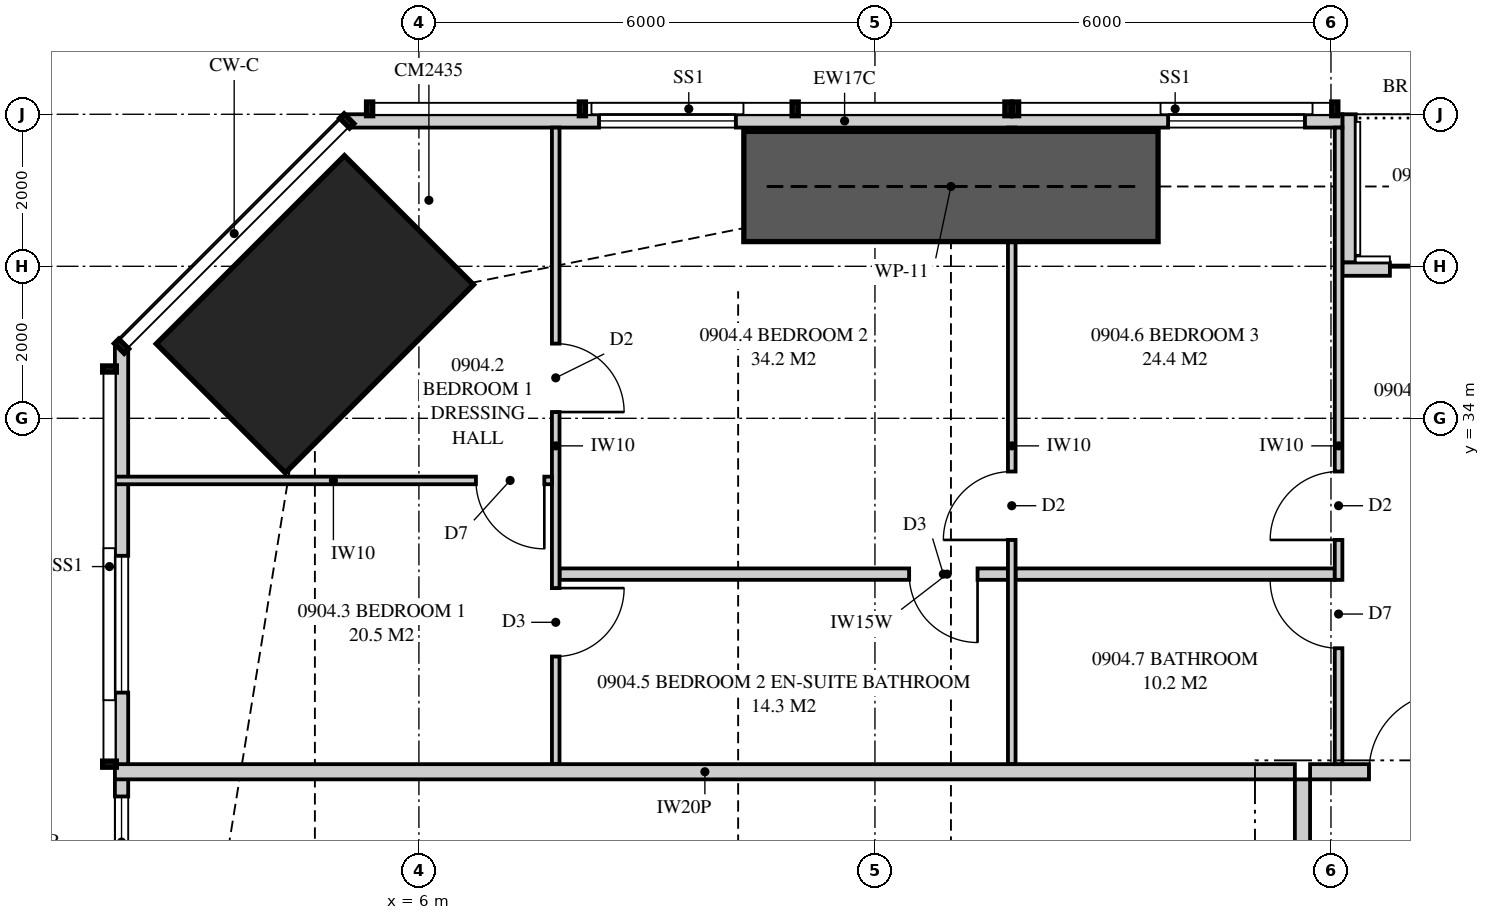
"""IFC4 building model, lengths in metres.
Left out: names, types, materials, properties, quantities, classifications, styles, units other than length and angle.
Written with IfcOpenShell. Run it as: python <this file> out.ifc"""

import sys

from ifc_helpers import new_model, si_unit, direction, frame, frame_2d, origin, origin_2d, place, context, subcontext, project, spatial, polyline, rectangle, outline, extrude, element, fill, save


model = new_model("IFC4")
c1 = context("Model", 3, precision=1e-05, world=origin(), true_north=direction((0.0, 1.0)))
c2 = subcontext(c1, "Body", "Model", "MODEL_VIEW")
j1 = project(units=[si_unit("LENGTHUNIT", "METRE"), si_unit("PLANEANGLEUNIT", "RADIAN")], contexts=[c1])
p1 = place(None, origin())
s1 = spatial("IfcSite", under=j1, at=p1, CompositionType="ELEMENT")
p2 = place(p1, origin())
s2 = spatial("IfcBuilding", under=s1, at=p2, CompositionType="ELEMENT")
p3 = place(p2, frame((0.0, 0.0, 37.75)))
s3 = spatial("IfcBuildingStorey", under=s2, at=p3, CompositionType="ELEMENT", Elevation=37.75)
p4 = place(p3, frame((4.631, 35.369, 0.0), z_axis=(0.0, 0.0, 1.0), x_axis=(0.707106781187, -0.707106781187, 0.0)))
e1 = element("IfcColumn", 1, at=p4, inside=s3, PredefinedType="COLUMN", context=c2, shape_type="SweptSolid", body=[
    extrude(rectangle(XDim=2.4, YDim=3.5, at=origin_2d()), origin(), (0.0, 0.0, 1.0), 3.35),
])
p5 = place(p3, frame((18.15, 37.913, 0.0), z_axis=(0.0, 0.0, 1.0), x_axis=(-1.0, 0.0, 0.0)))
e2 = element("IfcWall", 2, at=p5, inside=s3, PredefinedType="SOLIDWALL", context=c2, shape_type="SweptSolid", body=[
    extrude(outline(polyline([(0.0, 0.0), (13.099, 0.0), (13.099, 3.11), (5.354, 3.11), (5.354, 2.15), (5.306, 2.15), (5.306, 3.11), (5.15, 3.11), (5.15, 2.15), (0.0, 2.15), (0.0, 0.0)])), frame((0.0, 0.087, 0.0), z_axis=(0.0, -1.0, 0.0), x_axis=(1.0, 0.0, 0.0)), (0.0, 0.0, 1.0), 0.175),
])
p6 = place(p5, frame((0.492, 0.0, 0.4)))
e3 = element("IfcOpeningElement", 3, at=p6, cuts=e2, PredefinedType="OPENING", context=c2, shape_type="SweptSolid", body=[
    extrude(rectangle(XDim=1.8, YDim=1.7, at=frame_2d((0.9, 0.85))), frame((0.0, 0.097, 0.0), z_axis=(0.0, -1.0, 0.0), x_axis=(1.0, 0.0, 0.0)), (0.0, 0.0, 1.0), 0.195),
])
p7 = place(p5, frame((7.98, 0.0, 0.4)))
e4 = element("IfcOpeningElement", 4, at=p7, cuts=e2, PredefinedType="OPENING", context=c2, shape_type="SweptSolid", body=[
    extrude(rectangle(XDim=1.8, YDim=1.7, at=frame_2d((0.9, 0.85))), frame((0.0, 0.097, 0.0), z_axis=(0.0, -1.0, 0.0), x_axis=(1.0, 0.0, 0.0)), (0.0, 0.0, 1.0), 0.195),
])
p8 = place(p3, frame((21.2, 35.962, 0.0), z_axis=(0.0, 0.0, 1.0), x_axis=(-1.0, 0.0, 0.0)))
e5 = element("IfcWall", 5, at=p8, inside=s3, PredefinedType="SOLIDWALL", context=c2, shape_type="SweptSolid", body=[
    extrude(rectangle(XDim=3.05, YDim=0.175, at=frame_2d((1.525, 0.0))), origin(), (0.0, 0.0, 1.0), 3.11),
])
p9 = place(p8, frame((0.625, 0.0, 0.0)))
e6 = element("IfcOpeningElement", 6, at=p9, cuts=e5, PredefinedType="OPENING", context=c2, shape_type="SweptSolid", body=[
    extrude(rectangle(XDim=1.8, YDim=2.1, at=frame_2d((0.9, 1.05))), frame((0.0, 0.097, 0.0), z_axis=(0.0, -1.0, 0.0), x_axis=(1.0, 0.0, 0.0)), (0.0, 0.0, 1.0), 0.195),
])
p10 = place(p3, frame((18.238, 38.0, 0.0), z_axis=(0.0, 0.0, 1.0), x_axis=(0.0, -1.0, 0.0)))
e7 = element("IfcWall", 7, at=p10, inside=s3, PredefinedType="SOLIDWALL", context=c2, shape_type="SweptSolid", body=[
    extrude(outline(polyline([(0.0, 0.0), (1.95, 0.0), (1.95, 3.11), (1.75, 3.11), (1.75, 2.15), (0.15, 2.15), (0.15, 3.11), (0.0, 3.11), (0.0, 0.0)])), frame((0.0, 0.087, 0.0), z_axis=(0.0, -1.0, 0.0), x_axis=(1.0, 0.0, 0.0)), (0.0, 0.0, 1.0), 0.175),
])
p11 = place(p3, frame((2.087, 34.949, 0.0), z_axis=(0.0, 0.0, 1.0), x_axis=(0.0, -1.0, 0.0)))
e8 = element("IfcWall", 8, at=p11, inside=s3, PredefinedType="SOLIDWALL", context=c2, shape_type="SweptSolid", body=[
    extrude(outline(polyline([(0.0, 0.0), (16.099, 0.0), (16.099, 2.15), (9.949, 2.15), (9.949, 3.11), (9.823, 3.11), (9.823, 2.15), (9.73, 2.15), (9.73, 3.11), (0.0, 3.11), (0.0, 0.0)])), frame((0.0, 0.087, 0.0), z_axis=(0.0, -1.0, 0.0), x_axis=(1.0, 0.0, 0.0)), (0.0, 0.0, 1.0), 0.175),
])
p12 = place(p11, frame((2.757, 0.0, 0.4)))
e9 = element("IfcOpeningElement", 9, at=p12, cuts=e8, PredefinedType="OPENING", context=c2, shape_type="SweptSolid", body=[
    extrude(rectangle(XDim=1.8, YDim=1.7, at=frame_2d((0.9, 0.85))), frame((0.0, 0.097, 0.0), z_axis=(0.0, -1.0, 0.0), x_axis=(1.0, 0.0, 0.0)), (0.0, 0.0, 1.0), 0.195),
])
p13 = place(p11, frame((5.924, 0.0, 0.4)))
e10 = element("IfcOpeningElement", 10, at=p13, cuts=e8, PredefinedType="OPENING", context=c2, shape_type="SweptSolid", body=[
    extrude(rectangle(XDim=1.2, YDim=1.7, at=frame_2d((0.6, 0.85))), frame((0.0, 0.097, 0.0), z_axis=(0.0, -1.0, 0.0), x_axis=(1.0, 0.0, 0.0)), (0.0, 0.0, 1.0), 0.195),
])
p14 = place(p11, frame((12.799, 0.0, 0.4)))
e11 = element("IfcOpeningElement", 11, at=p14, cuts=e8, PredefinedType="OPENING", context=c2, shape_type="SweptSolid", body=[
    extrude(rectangle(XDim=1.8, YDim=1.7, at=frame_2d((0.9, 0.85))), frame((0.0, 0.097, 0.0), z_axis=(0.0, -1.0, 0.0), x_axis=(1.0, 0.0, 0.0)), (0.0, 0.0, 1.0), 0.195),
])
p15 = place(p3, frame((17.725, 29.35, 0.0), z_axis=(0.0, 0.0, 1.0), x_axis=(1.0, 0.0, 0.0)))
e12 = element("IfcWall", 12, at=p15, inside=s3, PredefinedType="PARTITIONING", context=c2, shape_type="SweptSolid", body=[
    extrude(rectangle(XDim=5.375, YDim=0.2, at=frame_2d((2.688, 0.0))), origin(), (0.0, 0.0, 1.0), 3.11),
])
p16 = place(p15, frame((0.775, 0.0, 0.0)))
e13 = element("IfcOpeningElement", 13, at=p16, cuts=e12, PredefinedType="OPENING", context=c2, shape_type="SweptSolid", body=[
    extrude(rectangle(XDim=1.05, YDim=2.2, at=frame_2d((0.525, 1.1))), frame((0.0, 0.11, 0.0), z_axis=(0.0, -1.0, 0.0), x_axis=(1.0, 0.0, 0.0)), (0.0, 0.0, 1.0), 0.22),
])
p17 = place(p3, frame((7.8, 37.825, 0.0), z_axis=(0.0, 0.0, 1.0), x_axis=(0.0, -1.0, 0.0)))
e14 = element("IfcWall", 14, at=p17, inside=s3, PredefinedType="PARTITIONING", context=c2, shape_type="SweptSolid", body=[
    extrude(outline(polyline([(0.0, 0.0), (8.375, 0.0), (8.375, 3.11), (2.697, 3.11), (2.697, 2.15), (0.943, 2.15), (0.943, 3.11), (0.0, 3.11), (0.0, 0.0)])), frame((0.0, 0.05, 0.0), z_axis=(0.0, -1.0, 0.0), x_axis=(1.0, 0.0, 0.0)), (0.0, 0.0, 1.0), 0.1),
])
p18 = place(p17, frame((2.842, 0.0, 0.0)))
e15 = element("IfcOpeningElement", 15, at=p18, cuts=e14, PredefinedType="OPENING", context=c2, shape_type="SweptSolid", body=[
    extrude(rectangle(XDim=0.9, YDim=2.1, at=frame_2d((0.45, 1.05))), frame((0.0, 0.06, 0.0), z_axis=(0.0, -1.0, 0.0), x_axis=(1.0, 0.0, 0.0)), (0.0, 0.0, 1.0), 0.12),
])
p19 = place(p17, frame((6.059, 0.0, 0.0)))
e16 = element("IfcOpeningElement", 16, at=p19, cuts=e14, PredefinedType="OPENING", context=c2, shape_type="SweptSolid", body=[
    extrude(rectangle(XDim=0.9, YDim=2.1, at=frame_2d((0.45, 1.05))), frame((0.0, 0.06, 0.0), z_axis=(0.0, -1.0, 0.0), x_axis=(1.0, 0.0, 0.0)), (0.0, 0.0, 1.0), 0.12),
])
p20 = place(p3, frame((13.8, 37.825, 0.0), z_axis=(0.0, 0.0, 1.0), x_axis=(0.0, -1.0, 0.0)))
e17 = element("IfcWall", 17, at=p20, inside=s3, PredefinedType="PARTITIONING", context=c2, shape_type="SweptSolid", body=[
    extrude(outline(polyline([(1.635, 2.15), (0.0, 2.15), (0.0, 0.0), (8.375, 0.0), (8.375, 3.11), (1.635, 3.11), (1.635, 2.15)]), holes=[polyline([(1.021, 0.126), (0.529, 0.126), (0.529, 0.919), (1.021, 0.919), (1.021, 0.126)]), polyline([(1.021, 1.231), (0.529, 1.231), (0.529, 2.024), (1.021, 2.024), (1.021, 1.231)])]), frame((0.0, 0.05, 0.0), z_axis=(0.0, -1.0, 0.0), x_axis=(1.0, 0.0, 0.0)), (0.0, 0.0, 1.0), 0.1),
])
p21 = place(p20, frame((4.525, 0.0, 0.0)))
e18 = element("IfcOpeningElement", 18, at=p21, cuts=e17, PredefinedType="OPENING", context=c2, shape_type="SweptSolid", body=[
    extrude(rectangle(XDim=0.9, YDim=2.1, at=frame_2d((0.45, 1.05))), frame((0.0, 0.06, 0.0), z_axis=(0.0, -1.0, 0.0), x_axis=(1.0, 0.0, 0.0)), (0.0, 0.0, 1.0), 0.12),
])
p22 = place(p3, frame((18.1, 37.825, 0.0), z_axis=(0.0, 0.0, 1.0), x_axis=(0.0, -1.0, 0.0)))
e19 = element("IfcWall", 19, at=p22, inside=s3, PredefinedType="PARTITIONING", context=c2, shape_type="SweptSolid", body=[
    extrude(outline(polyline([(0.0, 0.0), (8.375, 0.0), (8.375, 3.11), (1.635, 3.11), (1.635, 2.15), (0.0, 2.15), (0.0, 3.11), (0.0, 0.0)])), frame((0.0, 0.05, 0.0), z_axis=(0.0, -1.0, 0.0), x_axis=(1.0, 0.0, 0.0)), (0.0, 0.0, 1.0), 0.1),
])
p23 = place(p22, frame((4.525, 0.0, 0.0)))
e20 = element("IfcOpeningElement", 20, at=p23, cuts=e19, PredefinedType="OPENING", context=c2, shape_type="SweptSolid", body=[
    extrude(rectangle(XDim=0.9, YDim=2.1, at=frame_2d((0.45, 1.05))), frame((0.0, 0.06, 0.0), z_axis=(0.0, -1.0, 0.0), x_axis=(1.0, 0.0, 0.0)), (0.0, 0.0, 1.0), 0.12),
])
p24 = place(p22, frame((5.95, 0.0, 0.0)))
e21 = element("IfcOpeningElement", 21, at=p24, cuts=e19, PredefinedType="OPENING", context=c2, shape_type="SweptSolid", body=[
    extrude(rectangle(XDim=0.9, YDim=2.1, at=frame_2d((0.45, 1.05))), frame((0.0, 0.06, 0.0), z_axis=(0.0, -1.0, 0.0), x_axis=(1.0, 0.0, 0.0)), (0.0, 0.0, 1.0), 0.12),
])
p25 = place(p3, frame((2.0, 33.183, 0.0), z_axis=(0.0, 0.0, 1.0), x_axis=(1.0, 0.0, 0.0)))
e22 = element("IfcWall", 22, at=p25, inside=s3, PredefinedType="PARTITIONING", context=c2, shape_type="SweptSolid", body=[
    extrude(outline(polyline([(0.0, 0.0), (5.75, 0.0), (5.75, 3.11), (3.148, 3.11), (3.148, 2.15), (1.406, 2.15), (1.406, 3.11), (0.0, 3.11), (0.0, 0.0)])), frame((0.0, 0.05, 0.0), z_axis=(0.0, -1.0, 0.0), x_axis=(1.0, 0.0, 0.0)), (0.0, 0.0, 1.0), 0.1),
])
p26 = place(p25, frame((4.75, 0.0, 0.0)))
e23 = element("IfcOpeningElement", 23, at=p26, cuts=e22, PredefinedType="OPENING", context=c2, shape_type="SweptSolid", body=[
    extrude(rectangle(XDim=0.9, YDim=2.1, at=frame_2d((0.45, 1.05))), frame((0.0, 0.06, 0.0), z_axis=(0.0, -1.0, 0.0), x_axis=(1.0, 0.0, 0.0)), (0.0, 0.0, 1.0), 0.12),
])
p27 = place(p3, frame((7.85, 31.95, 0.0), z_axis=(0.0, 0.0, 1.0), x_axis=(1.0, 0.0, 0.0)))
e24 = element("IfcWall", 24, at=p27, inside=s3, PredefinedType="PLUMBINGWALL", context=c2, shape_type="SweptSolid", body=[
    extrude(outline(polyline([(0.0, 0.0), (5.9, 0.0), (5.9, 3.11), (5.462, 3.11), (5.462, 2.541), (4.838, 2.541), (4.838, 3.11), (3.635, 3.11), (3.635, 2.51), (1.065, 2.51), (1.065, 3.11), (0.0, 3.11), (0.0, 0.0)])), frame((0.0, 0.075, 0.0), z_axis=(0.0, -1.0, 0.0), x_axis=(1.0, 0.0, 0.0)), (0.0, 0.0, 1.0), 0.15),
])
p28 = place(p27, frame((4.6, 0.0, 0.0)))
e25 = element("IfcOpeningElement", 25, at=p28, cuts=e24, PredefinedType="OPENING", context=c2, shape_type="SweptSolid", body=[
    extrude(rectangle(XDim=0.9, YDim=2.1, at=frame_2d((0.45, 1.05))), frame((0.0, 0.085, 0.0), z_axis=(0.0, -1.0, 0.0), x_axis=(1.0, 0.0, 0.0)), (0.0, 0.0, 1.0), 0.17),
])
p29 = place(p3, frame((13.85, 31.95, 0.0), z_axis=(0.0, 0.0, 1.0), x_axis=(1.0, 0.0, 0.0)))
e26 = element("IfcWall", 26, at=p29, inside=s3, PredefinedType="PLUMBINGWALL", context=c2, shape_type="SweptSolid", body=[
    extrude(rectangle(XDim=4.2, YDim=0.15, at=frame_2d((2.1, 0.0))), origin(), (0.0, 0.0, 1.0), 3.11),
])
p30 = place(p3, frame((2.0, 29.35, 0.0), z_axis=(0.0, 0.0, 1.0), x_axis=(1.0, 0.0, 0.0)))
e27 = element("IfcWall", 27, at=p30, inside=s3, PredefinedType="PARTITIONING", context=c2, shape_type="SweptSolid", body=[
    extrude(outline(polyline([(0.0, 0.0), (15.525, 0.0), (15.525, 3.11), (11.337, 3.11), (11.337, 2.541), (10.663, 2.541), (10.663, 3.11), (9.51, 3.11), (9.51, 2.51), (6.89, 2.51), (6.89, 3.11), (2.969, 3.11), (2.969, 2.541), (2.577, 2.541), (2.577, 2.15), (0.733, 2.15), (0.733, 3.11), (0.0, 3.11), (0.0, 0.0)])), frame((0.0, 0.1, 0.0), z_axis=(0.0, -1.0, 0.0), x_axis=(1.0, 0.0, 0.0)), (0.0, 0.0, 1.0), 0.2),
])
p31 = place(p3, frame((17.625, 24.1, 0.0), z_axis=(0.0, 0.0, 1.0), x_axis=(0.0, 1.0, 0.0)))
e28 = element("IfcWall", 28, at=p31, inside=s3, PredefinedType="PARTITIONING", context=c2, shape_type="SweptSolid", body=[
    extrude(outline(polyline([(0.0, 0.0), (5.15, 0.0), (5.15, 3.11), (1.237, 3.11), (1.237, 2.541), (0.562, 2.541), (0.562, 3.11), (0.0, 3.11), (0.0, 0.0)])), frame((0.0, 0.1, 0.0), z_axis=(0.0, -1.0, 0.0), x_axis=(1.0, 0.0, 0.0)), (0.0, 0.0, 1.0), 0.2),
])
p32 = place(p31, frame((1.675, 0.0, 0.0)))
e29 = element("IfcOpeningElement", 29, at=p32, cuts=e28, PredefinedType="OPENING", context=c2, shape_type="SweptSolid", body=[
    extrude(rectangle(XDim=1.8, YDim=2.1, at=frame_2d((0.9, 1.05))), frame((0.0, 0.11, 0.0), z_axis=(0.0, -1.0, 0.0), x_axis=(1.0, 0.0, 0.0)), (0.0, 0.0, 1.0), 0.22),
])
p33 = place(p3, frame((10.275, 37.05, 0.0), z_axis=(0.0, 0.0, 1.0), x_axis=(1.0, 0.0, 0.0)))
e30 = element("IfcWall", 30, at=p33, inside=s3, PredefinedType="SHEAR", context=c2, shape_type="SweptSolid", body=[
    extrude(rectangle(XDim=5.45, YDim=1.45, at=frame_2d((2.725, 0.0))), origin(), (0.0, 0.0, 1.0), 3.35),
])
p34 = place(p9, origin())
e31 = element("IfcDoor", 31, at=p34, inside=s3, OperationType="SLIDING_TO_LEFT", PredefinedType="DOOR", context=c2, shape_type="SweptSolid", body=[
    extrude(rectangle(XDim=1.8, YDim=2.1, at=frame_2d((0.9, 1.05))), frame((0.0, 0.025, 0.0), z_axis=(0.0, -1.0, 0.0), x_axis=(1.0, 0.0, 0.0)), (0.0, 0.0, 1.0), 0.05),
])
fill(e6, e31)
p35 = place(p6, origin())
e32 = element("IfcWindow", 32, at=p35, inside=s3, PartitioningType="SINGLE_PANEL", PredefinedType="WINDOW", context=c2, shape_type="SweptSolid", body=[
    extrude(rectangle(XDim=1.8, YDim=1.7, at=frame_2d((0.9, 0.85))), frame((0.0, 0.03, 0.0), z_axis=(0.0, -1.0, 0.0), x_axis=(1.0, 0.0, 0.0)), (0.0, 0.0, 1.0), 0.06),
])
fill(e3, e32)
p36 = place(p7, origin())
e33 = element("IfcWindow", 33, at=p36, inside=s3, PartitioningType="SINGLE_PANEL", PredefinedType="WINDOW", context=c2, shape_type="SweptSolid", body=[
    extrude(rectangle(XDim=1.8, YDim=1.7, at=frame_2d((0.9, 0.85))), frame((0.0, 0.03, 0.0), z_axis=(0.0, -1.0, 0.0), x_axis=(1.0, 0.0, 0.0)), (0.0, 0.0, 1.0), 0.06),
])
fill(e4, e33)
p37 = place(p12, origin())
e34 = element("IfcWindow", 34, at=p37, inside=s3, PartitioningType="SINGLE_PANEL", PredefinedType="WINDOW", context=c2, shape_type="SweptSolid", body=[
    extrude(rectangle(XDim=1.8, YDim=1.7, at=frame_2d((0.9, 0.85))), frame((0.0, 0.03, 0.0), z_axis=(0.0, -1.0, 0.0), x_axis=(1.0, 0.0, 0.0)), (0.0, 0.0, 1.0), 0.06),
])
fill(e9, e34)
p38 = place(p13, origin())
e35 = element("IfcWindow", 35, at=p38, inside=s3, PartitioningType="SINGLE_PANEL", PredefinedType="WINDOW", context=c2, shape_type="SweptSolid", body=[
    extrude(rectangle(XDim=1.2, YDim=1.7, at=frame_2d((0.6, 0.85))), frame((0.0, 0.03, 0.0), z_axis=(0.0, -1.0, 0.0), x_axis=(1.0, 0.0, 0.0)), (0.0, 0.0, 1.0), 0.06),
])
fill(e10, e35)
p39 = place(p16, origin())
e36 = element("IfcDoor", 36, at=p39, inside=s3, OperationType="SINGLE_SWING_RIGHT", PredefinedType="DOOR", context=c2, shape_type="SweptSolid", body=[
    extrude(rectangle(XDim=1.05, YDim=2.2, at=frame_2d((0.525, 1.1))), frame((0.0, 0.025, 0.0), z_axis=(0.0, -1.0, 0.0), x_axis=(1.0, 0.0, 0.0)), (0.0, 0.0, 1.0), 0.05),
])
fill(e13, e36)
p40 = place(p26, frame((0.9, 0.0, 0.0), z_axis=(0.0, 0.0, 1.0), x_axis=(-1.0, 0.0, 0.0)))
e37 = element("IfcDoor", 37, at=p40, inside=s3, OperationType="SINGLE_SWING_LEFT", PredefinedType="DOOR", context=c2, shape_type="SweptSolid", body=[
    extrude(rectangle(XDim=0.9, YDim=2.1, at=frame_2d((0.45, 1.05))), frame((0.0, 0.025, 0.0), z_axis=(0.0, -1.0, 0.0), x_axis=(1.0, 0.0, 0.0)), (0.0, 0.0, 1.0), 0.05),
])
fill(e23, e37)
p41 = place(p18, origin())
e38 = element("IfcDoor", 38, at=p41, inside=s3, OperationType="SINGLE_SWING_RIGHT", PredefinedType="DOOR", context=c2, shape_type="SweptSolid", body=[
    extrude(rectangle(XDim=0.9, YDim=2.1, at=frame_2d((0.45, 1.05))), frame((0.0, 0.025, 0.0), z_axis=(0.0, -1.0, 0.0), x_axis=(1.0, 0.0, 0.0)), (0.0, 0.0, 1.0), 0.05),
])
fill(e15, e38)
p42 = place(p21, frame((0.9, 0.0, 0.0), z_axis=(0.0, 0.0, 1.0), x_axis=(-1.0, 0.0, 0.0)))
e39 = element("IfcDoor", 39, at=p42, inside=s3, OperationType="SINGLE_SWING_LEFT", PredefinedType="DOOR", context=c2, shape_type="SweptSolid", body=[
    extrude(rectangle(XDim=0.9, YDim=2.1, at=frame_2d((0.45, 1.05))), frame((0.0, 0.025, 0.0), z_axis=(0.0, -1.0, 0.0), x_axis=(1.0, 0.0, 0.0)), (0.0, 0.0, 1.0), 0.05),
])
fill(e18, e39)
p43 = place(p28, frame((0.9, 0.0, 0.0), z_axis=(0.0, 0.0, 1.0), x_axis=(-1.0, 0.0, 0.0)))
e40 = element("IfcDoor", 40, at=p43, inside=s3, OperationType="SINGLE_SWING_LEFT", PredefinedType="DOOR", context=c2, shape_type="SweptSolid", body=[
    extrude(rectangle(XDim=0.9, YDim=2.1, at=frame_2d((0.45, 1.05))), frame((0.0, 0.025, 0.0), z_axis=(0.0, -1.0, 0.0), x_axis=(1.0, 0.0, 0.0)), (0.0, 0.0, 1.0), 0.05),
])
fill(e25, e40)
p44 = place(p23, frame((0.9, 0.0, 0.0), z_axis=(0.0, 0.0, 1.0), x_axis=(-1.0, 0.0, 0.0)))
e41 = element("IfcDoor", 41, at=p44, inside=s3, OperationType="SINGLE_SWING_LEFT", PredefinedType="DOOR", context=c2, shape_type="SweptSolid", body=[
    extrude(rectangle(XDim=0.9, YDim=2.1, at=frame_2d((0.45, 1.05))), frame((0.0, 0.025, 0.0), z_axis=(0.0, -1.0, 0.0), x_axis=(1.0, 0.0, 0.0)), (0.0, 0.0, 1.0), 0.05),
])
fill(e20, e41)
p45 = place(p24, frame((0.9, 0.0, 0.0), z_axis=(0.0, 0.0, 1.0), x_axis=(-1.0, 0.0, 0.0)))
e42 = element("IfcDoor", 42, at=p45, inside=s3, OperationType="SINGLE_SWING_RIGHT", PredefinedType="DOOR", context=c2, shape_type="SweptSolid", body=[
    extrude(rectangle(XDim=0.9, YDim=2.1, at=frame_2d((0.45, 1.05))), frame((0.0, 0.025, 0.0), z_axis=(0.0, -1.0, 0.0), x_axis=(1.0, 0.0, 0.0)), (0.0, 0.0, 1.0), 0.05),
])
fill(e21, e42)
p46 = place(p19, origin())
e43 = element("IfcDoor", 43, at=p46, inside=s3, OperationType="SINGLE_SWING_LEFT", PredefinedType="DOOR", context=c2, shape_type="SweptSolid", body=[
    extrude(rectangle(XDim=0.9, YDim=2.1, at=frame_2d((0.45, 1.05))), frame((0.0, 0.025, 0.0), z_axis=(0.0, -1.0, 0.0), x_axis=(1.0, 0.0, 0.0)), (0.0, 0.0, 1.0), 0.05),
])
fill(e16, e43)
save(model, sys.argv[1])
